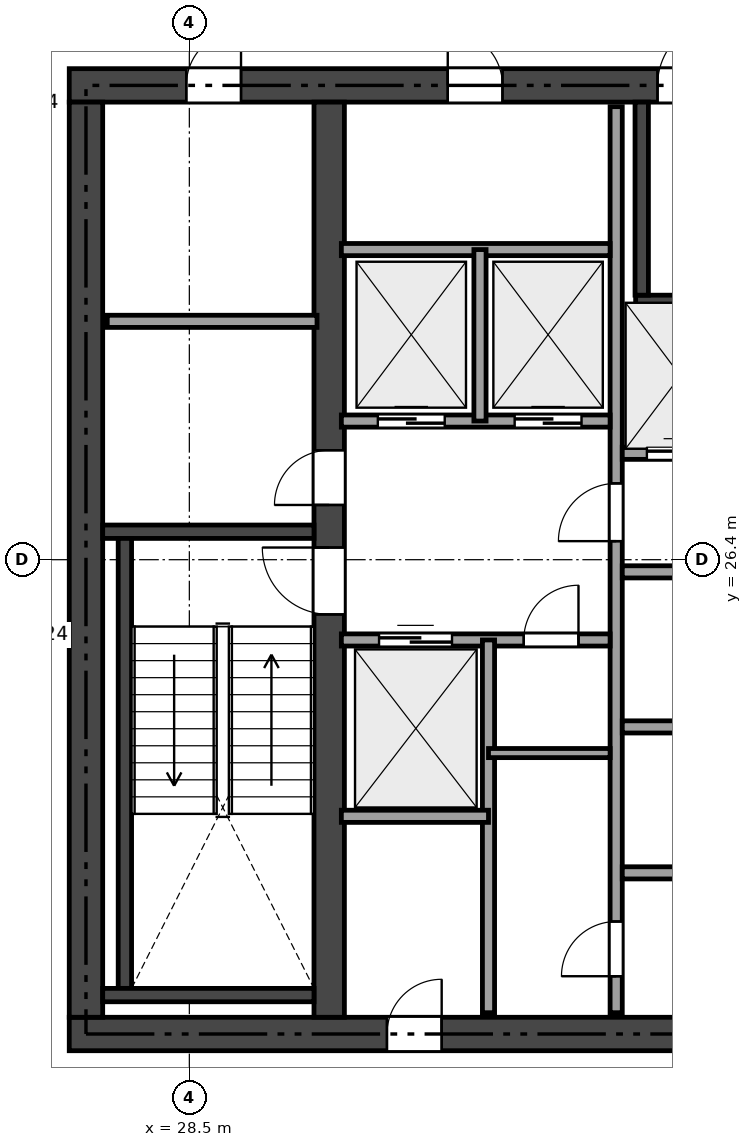
"""IFC4 building model, lengths in metres.
Left out: names, types, materials, properties, quantities, classifications, styles, units other than length and angle.
Written with IfcOpenShell. Run it as: python <this file> out.ifc"""

import sys

from ifc_helpers import new_model, si_unit, direction, frame, frame_2d, origin, place, context, subcontext, project, spatial, rectangle, extrude, element, fill, save


model = new_model("IFC4")
c1 = context("Model", 3, precision=1e-05, world=origin(), true_north=direction((0.0, 1.0)))
c2 = subcontext(c1, "Body", "Model", "MODEL_VIEW")
j1 = project(units=[si_unit("LENGTHUNIT", "METRE"), si_unit("PLANEANGLEUNIT", "RADIAN")], contexts=[c1])
p1 = place(None, origin())
s1 = spatial("IfcSite", under=j1, at=p1, CompositionType="ELEMENT")
p2 = place(p1, origin())
s2 = spatial("IfcBuilding", under=s1, at=p2, CompositionType="ELEMENT")
p3 = place(p2, frame((0.0, 0.0, 279.3)))
s3 = spatial("IfcBuildingStorey", under=s2, at=p3, CompositionType="ELEMENT", Elevation=279.3)
p4 = place(p3, frame((26.525, 18.6, 0.0), z_axis=(0.0, 0.0, 1.0), x_axis=(1.0, 0.0, 0.0)))
e1 = element("IfcWall", 1, at=p4, inside=s3, PredefinedType="SHEAR", context=c2, shape_type="SweptSolid", body=[
    extrude(rectangle(XDim=21.35, YDim=0.55, at=frame_2d((10.675, 0.0))), origin(), (0.0, 0.0, 1.0), 3.84),
])
p5 = place(p4, frame((12.4, 0.0, 0.0)))
e2 = element("IfcOpeningElement", 2, at=p5, cuts=e1, PredefinedType="OPENING", context=c2, shape_type="SweptSolid", body=[
    extrude(rectangle(XDim=1.15, YDim=2.15, at=frame_2d((0.575, 1.075))), frame((0.0, 0.285, 0.0), z_axis=(0.0, -1.0, 0.0), x_axis=(1.0, 0.0, 0.0)), (0.0, 0.0, 1.0), 0.57),
])
p6 = place(p4, frame((5.225, 0.0, 0.0)))
e3 = element("IfcOpeningElement", 3, at=p6, cuts=e1, PredefinedType="OPENING", context=c2, shape_type="SweptSolid", body=[
    extrude(rectangle(XDim=0.9, YDim=2.1, at=frame_2d((0.45, 1.05))), frame((0.0, 0.285, 0.0), z_axis=(0.0, -1.0, 0.0), x_axis=(1.0, 0.0, 0.0)), (0.0, 0.0, 1.0), 0.57),
])
p7 = place(p3, frame((26.525, 34.2, 0.0), z_axis=(0.0, 0.0, 1.0), x_axis=(1.0, 0.0, 0.0)))
e4 = element("IfcWall", 4, at=p7, inside=s3, PredefinedType="SHEAR", context=c2, shape_type="SweptSolid", body=[
    extrude(rectangle(XDim=21.35, YDim=0.55, at=frame_2d((10.675, 0.0))), origin(), (0.0, 0.0, 1.0), 3.84),
])
p8 = place(p7, frame((9.675, 0.0, 0.0)))
e5 = element("IfcOpeningElement", 5, at=p8, cuts=e4, PredefinedType="OPENING", context=c2, shape_type="SweptSolid", body=[
    extrude(rectangle(XDim=1.1, YDim=2.15, at=frame_2d((0.55, 1.075))), frame((0.0, 0.285, 0.0), z_axis=(0.0, -1.0, 0.0), x_axis=(1.0, 0.0, 0.0)), (0.0, 0.0, 1.0), 0.57),
])
p9 = place(p7, frame((1.925, 0.0, 0.0)))
e6 = element("IfcOpeningElement", 6, at=p9, cuts=e4, PredefinedType="OPENING", context=c2, shape_type="SweptSolid", body=[
    extrude(rectangle(XDim=0.9, YDim=2.1, at=frame_2d((0.45, 1.05))), frame((0.0, 0.285, 0.0), z_axis=(0.0, -1.0, 0.0), x_axis=(1.0, 0.0, 0.0)), (0.0, 0.0, 1.0), 0.57),
])
p10 = place(p7, frame((6.225, 0.0, 0.0)))
e7 = element("IfcOpeningElement", 7, at=p10, cuts=e4, PredefinedType="OPENING", context=c2, shape_type="SweptSolid", body=[
    extrude(rectangle(XDim=0.9, YDim=2.1, at=frame_2d((0.45, 1.05))), frame((0.0, 0.285, 0.0), z_axis=(0.0, -1.0, 0.0), x_axis=(1.0, 0.0, 0.0)), (0.0, 0.0, 1.0), 0.57),
])
p11 = place(p3, frame((26.8, 18.875, 0.0), z_axis=(0.0, 0.0, 1.0), x_axis=(0.0, 1.0, 0.0)))
e8 = element("IfcWall", 8, at=p11, inside=s3, PredefinedType="SHEAR", context=c2, shape_type="SweptSolid", body=[
    extrude(rectangle(XDim=15.05, YDim=0.55, at=frame_2d((7.525, 0.0))), origin(), (0.0, 0.0, 1.0), 3.84),
])
p12 = place(p3, frame((30.8, 18.875, 0.0), z_axis=(0.0, 0.0, 1.0), x_axis=(0.0, 1.0, 0.0)))
e9 = element("IfcWall", 9, at=p12, inside=s3, PredefinedType="SHEAR", context=c2, shape_type="SweptSolid", body=[
    extrude(rectangle(XDim=15.05, YDim=0.5, at=frame_2d((7.525, 0.0))), origin(), (0.0, 0.0, 1.0), 3.84),
])
p13 = place(p12, frame((6.625, 0.0, 0.0)))
e10 = element("IfcOpeningElement", 10, at=p13, cuts=e9, PredefinedType="OPENING", context=c2, shape_type="SweptSolid", body=[
    extrude(rectangle(XDim=1.1, YDim=2.15, at=frame_2d((0.55, 1.075))), frame((0.0, 0.26, 0.0), z_axis=(0.0, -1.0, 0.0), x_axis=(1.0, 0.0, 0.0)), (0.0, 0.0, 1.0), 0.52),
])
p14 = place(p12, frame((8.425, 0.0, 0.0)))
e11 = element("IfcOpeningElement", 11, at=p14, cuts=e9, PredefinedType="OPENING", context=c2, shape_type="SweptSolid", body=[
    extrude(rectangle(XDim=0.9, YDim=2.1, at=frame_2d((0.45, 1.05))), frame((0.0, 0.26, 0.0), z_axis=(0.0, -1.0, 0.0), x_axis=(1.0, 0.0, 0.0)), (0.0, 0.0, 1.0), 0.52),
])
p15 = place(p3, frame((27.075, 26.86, 0.0), z_axis=(0.0, 0.0, 1.0), x_axis=(1.0, 0.0, 0.0)))
e12 = element("IfcWall", 12, at=p15, inside=s3, PredefinedType="SHEAR", context=c2, shape_type="SweptSolid", body=[
    extrude(rectangle(XDim=3.475, YDim=0.22, at=frame_2d((1.738, 0.0))), origin(), (0.0, 0.0, 1.0), 3.84),
])
p16 = place(p3, frame((27.44, 19.35, 0.0), z_axis=(0.0, 0.0, 1.0), x_axis=(0.0, 1.0, 0.0)))
e13 = element("IfcWall", 13, at=p16, inside=s3, PredefinedType="SHEAR", context=c2, shape_type="SweptSolid", body=[
    extrude(rectangle(XDim=7.4, YDim=0.22, at=frame_2d((3.7, 0.0))), origin(), (0.0, 0.0, 1.0), 3.84),
])
p17 = place(p3, frame((27.075, 19.24, 0.0), z_axis=(0.0, 0.0, 1.0), x_axis=(1.0, 0.0, 0.0)))
e14 = element("IfcWall", 14, at=p17, inside=s3, PredefinedType="SHEAR", context=c2, shape_type="SweptSolid", body=[
    extrude(rectangle(XDim=3.475, YDim=0.22, at=frame_2d((1.738, 0.0))), origin(), (0.0, 0.0, 1.0), 3.84),
])
p18 = place(p3, frame((35.84, 30.64, 0.0), z_axis=(0.0, 0.0, 1.0), x_axis=(1.0, 0.0, 0.0)))
e15 = element("IfcWall", 15, at=p18, inside=s3, PredefinedType="SHEAR", context=c2, shape_type="SweptSolid", body=[
    extrude(rectangle(XDim=7.61, YDim=0.22, at=frame_2d((3.805, 0.0))), origin(), (0.0, 0.0, 1.0), 3.84),
])
p19 = place(p3, frame((35.94, 30.75, 0.0), z_axis=(0.0, 0.0, 1.0), x_axis=(0.0, 1.0, 0.0)))
e16 = element("IfcWall", 16, at=p19, inside=s3, PredefinedType="SHEAR", context=c2, shape_type="SweptSolid", body=[
    extrude(rectangle(XDim=3.175, YDim=0.22, at=frame_2d((1.587, 0.0))), origin(), (0.0, 0.0, 1.0), 3.84),
])
p20 = place(p3, frame((27.15, 30.32, 0.0), z_axis=(0.0, 0.0, 1.0), x_axis=(1.0, 0.0, 0.0)))
e17 = element("IfcWall", 17, at=p20, inside=s3, PredefinedType="SOLIDWALL", context=c2, shape_type="SweptSolid", body=[
    extrude(rectangle(XDim=3.45, YDim=0.2, at=frame_2d((1.725, 0.0))), origin(), (0.0, 0.0, 1.0), 3.513),
])
p21 = place(p3, frame((35.52, 18.95, 0.0), z_axis=(0.0, 0.0, 1.0), x_axis=(0.0, 1.0, 0.0)))
e18 = element("IfcWall", 18, at=p21, inside=s3, PredefinedType="SOLIDWALL", context=c2, shape_type="SweptSolid", body=[
    extrude(rectangle(XDim=14.9, YDim=0.2, at=frame_2d((7.45, 0.0))), origin(), (0.0, 0.0, 1.0), 3.361),
])
p22 = place(p21, frame((7.755, 0.0, 0.0)))
e19 = element("IfcOpeningElement", 19, at=p22, cuts=e18, PredefinedType="OPENING", context=c2, shape_type="SweptSolid", body=[
    extrude(rectangle(XDim=0.95, YDim=2.15, at=frame_2d((0.475, 1.075))), frame((0.0, 0.11, 0.0), z_axis=(0.0, -1.0, 0.0), x_axis=(1.0, 0.0, 0.0)), (0.0, 0.0, 1.0), 0.22),
])
p23 = place(p21, frame((0.6, 0.0, 0.0)))
e20 = element("IfcOpeningElement", 20, at=p23, cuts=e18, PredefinedType="OPENING", context=c2, shape_type="SweptSolid", body=[
    extrude(rectangle(XDim=0.9, YDim=2.1, at=frame_2d((0.45, 1.05))), frame((0.0, 0.11, 0.0), z_axis=(0.0, -1.0, 0.0), x_axis=(1.0, 0.0, 0.0)), (0.0, 0.0, 1.0), 0.22),
])
p24 = place(p3, frame((31.0, 28.68, 0.0), z_axis=(0.0, 0.0, 1.0), x_axis=(1.0, 0.0, 0.0)))
e21 = element("IfcWall", 21, at=p24, inside=s3, PredefinedType="SOLIDWALL", context=c2, shape_type="SweptSolid", body=[
    extrude(rectangle(XDim=4.42, YDim=0.2, at=frame_2d((2.21, 0.0))), origin(), (0.0, 0.0, 1.0), 3.84),
])
p25 = place(p24, frame((0.6, 0.0, 0.0)))
e22 = element("IfcOpeningElement", 22, at=p25, cuts=e21, PredefinedType="OPENING", context=c2, shape_type="SweptSolid", body=[
    extrude(rectangle(XDim=1.1, YDim=2.15, at=frame_2d((0.55, 1.075))), frame((0.0, 0.11, 0.0), z_axis=(0.0, -1.0, 0.0), x_axis=(1.0, 0.0, 0.0)), (0.0, 0.0, 1.0), 0.22),
])
p26 = place(p24, frame((2.85, 0.0, 0.0)))
e23 = element("IfcOpeningElement", 23, at=p26, cuts=e21, PredefinedType="OPENING", context=c2, shape_type="SweptSolid", body=[
    extrude(rectangle(XDim=1.1, YDim=2.15, at=frame_2d((0.55, 1.075))), frame((0.0, 0.11, 0.0), z_axis=(0.0, -1.0, 0.0), x_axis=(1.0, 0.0, 0.0)), (0.0, 0.0, 1.0), 0.22),
])
p27 = place(p3, frame((31.0, 31.5, 0.0), z_axis=(0.0, 0.0, 1.0), x_axis=(1.0, 0.0, 0.0)))
e24 = element("IfcWall", 24, at=p27, inside=s3, PredefinedType="SOLIDWALL", context=c2, shape_type="SweptSolid", body=[
    extrude(rectangle(XDim=4.42, YDim=0.2, at=frame_2d((2.21, 0.0))), origin(), (0.0, 0.0, 1.0), 3.84),
])
p28 = place(p3, frame((33.28, 28.68, 0.0), z_axis=(0.0, 0.0, 1.0), x_axis=(0.0, 1.0, 0.0)))
e25 = element("IfcWall", 25, at=p28, inside=s3, PredefinedType="SOLIDWALL", context=c2, shape_type="SweptSolid", body=[
    extrude(rectangle(XDim=2.82, YDim=0.2, at=frame_2d((1.41, 0.0))), origin(), (0.0, 0.0, 1.0), 3.84),
])
p29 = place(p3, frame((31.0, 25.08, 0.0), z_axis=(0.0, 0.0, 1.0), x_axis=(1.0, 0.0, 0.0)))
e26 = element("IfcWall", 26, at=p29, inside=s3, PredefinedType="SOLIDWALL", context=c2, shape_type="SweptSolid", body=[
    extrude(rectangle(XDim=4.42, YDim=0.2, at=frame_2d((2.21, 0.0))), origin(), (0.0, 0.0, 1.0), 3.84),
])
p30 = place(p29, frame((3.0, 0.0, 0.0)))
e27 = element("IfcOpeningElement", 27, at=p30, cuts=e26, PredefinedType="OPENING", context=c2, shape_type="SweptSolid", body=[
    extrude(rectangle(XDim=0.9, YDim=2.1, at=frame_2d((0.45, 1.05))), frame((0.0, 0.11, 0.0), z_axis=(0.0, -1.0, 0.0), x_axis=(1.0, 0.0, 0.0)), (0.0, 0.0, 1.0), 0.22),
])
p31 = place(p29, frame((0.62, 0.0, 0.0)))
e28 = element("IfcOpeningElement", 28, at=p31, cuts=e26, PredefinedType="OPENING", context=c2, shape_type="SweptSolid", body=[
    extrude(rectangle(XDim=1.2, YDim=2.15, at=frame_2d((0.6, 1.075))), frame((0.0, 0.11, 0.0), z_axis=(0.0, -1.0, 0.0), x_axis=(1.0, 0.0, 0.0)), (0.0, 0.0, 1.0), 0.22),
])
p32 = place(p3, frame((33.42, 18.95, 0.0), z_axis=(0.0, 0.0, 1.0), x_axis=(0.0, 1.0, 0.0)))
e29 = element("IfcWall", 29, at=p32, inside=s3, PredefinedType="SOLIDWALL", context=c2, shape_type="SweptSolid", body=[
    extrude(rectangle(XDim=6.13, YDim=0.2, at=frame_2d((3.065, 0.0))), origin(), (0.0, 0.0, 1.0), 3.361),
])
p33 = place(p3, frame((31.0, 22.18, 0.0), z_axis=(0.0, 0.0, 1.0), x_axis=(1.0, 0.0, 0.0)))
e30 = element("IfcWall", 30, at=p33, inside=s3, PredefinedType="SOLIDWALL", context=c2, shape_type="SweptSolid", body=[
    extrude(rectangle(XDim=2.42, YDim=0.2, at=frame_2d((1.21, 0.0))), origin(), (0.0, 0.0, 1.0), 3.84),
])
p34 = place(p3, frame((33.42, 23.22, 0.0), z_axis=(0.0, 0.0, 1.0), x_axis=(1.0, 0.0, 0.0)))
e31 = element("IfcWall", 31, at=p34, inside=s3, PredefinedType="PARTITIONING", context=c2, shape_type="SweptSolid", body=[
    extrude(rectangle(XDim=2.0, YDim=0.15, at=frame_2d((1.0, 0.0))), origin(), (0.0, 0.0, 1.0), 3.84),
])
p35 = place(p3, frame((35.62, 28.15, 0.0), z_axis=(0.0, 0.0, 1.0), x_axis=(1.0, 0.0, 0.0)))
e32 = element("IfcWall", 32, at=p35, inside=s3, PredefinedType="SOLIDWALL", context=c2, shape_type="SweptSolid", body=[
    extrude(rectangle(XDim=7.88, YDim=0.2, at=frame_2d((3.94, 0.0))), origin(), (0.0, 0.0, 1.0), 3.84),
])
p36 = place(p35, frame((0.405, 0.0, 0.0)))
e33 = element("IfcOpeningElement", 33, at=p36, cuts=e32, PredefinedType="OPENING", context=c2, shape_type="SweptSolid", body=[
    extrude(rectangle(XDim=1.1, YDim=2.15, at=frame_2d((0.55, 1.075))), frame((0.0, 0.11, 0.0), z_axis=(0.0, -1.0, 0.0), x_axis=(1.0, 0.0, 0.0)), (0.0, 0.0, 1.0), 0.22),
])
p37 = place(p35, frame((2.355, 0.0, 0.0)))
e34 = element("IfcOpeningElement", 34, at=p37, cuts=e32, PredefinedType="OPENING", context=c2, shape_type="SweptSolid", body=[
    extrude(rectangle(XDim=1.1, YDim=2.15, at=frame_2d((0.55, 1.075))), frame((0.0, 0.11, 0.0), z_axis=(0.0, -1.0, 0.0), x_axis=(1.0, 0.0, 0.0)), (0.0, 0.0, 1.0), 0.22),
])
p38 = place(p35, frame((4.305, 0.0, 0.0)))
e35 = element("IfcOpeningElement", 35, at=p38, cuts=e32, PredefinedType="OPENING", context=c2, shape_type="SweptSolid", body=[
    extrude(rectangle(XDim=1.1, YDim=2.15, at=frame_2d((0.55, 1.075))), frame((0.0, 0.11, 0.0), z_axis=(0.0, -1.0, 0.0), x_axis=(1.0, 0.0, 0.0)), (0.0, 0.0, 1.0), 0.22),
])
p39 = place(p35, frame((6.255, 0.0, 0.0)))
e36 = element("IfcOpeningElement", 36, at=p39, cuts=e32, PredefinedType="OPENING", context=c2, shape_type="SweptSolid", body=[
    extrude(rectangle(XDim=1.1, YDim=2.15, at=frame_2d((0.55, 1.075))), frame((0.0, 0.11, 0.0), z_axis=(0.0, -1.0, 0.0), x_axis=(1.0, 0.0, 0.0)), (0.0, 0.0, 1.0), 0.22),
])
p40 = place(p3, frame((35.62, 26.2, 0.0), z_axis=(0.0, 0.0, 1.0), x_axis=(1.0, 0.0, 0.0)))
e37 = element("IfcWall", 37, at=p40, inside=s3, PredefinedType="SOLIDWALL", context=c2, shape_type="SweptSolid", body=[
    extrude(rectangle(XDim=7.88, YDim=0.2, at=frame_2d((3.94, 0.0))), origin(), (0.0, 0.0, 1.0), 3.84),
])
p41 = place(p40, frame((1.13, 0.0, 0.0)))
e38 = element("IfcOpeningElement", 38, at=p41, cuts=e37, PredefinedType="OPENING", context=c2, shape_type="SweptSolid", body=[
    extrude(rectangle(XDim=0.9, YDim=2.1, at=frame_2d((0.45, 1.05))), frame((0.0, 0.11, 0.0), z_axis=(0.0, -1.0, 0.0), x_axis=(1.0, 0.0, 0.0)), (0.0, 0.0, 1.0), 0.22),
])
p42 = place(p40, frame((5.73, 0.0, 0.0)))
e39 = element("IfcOpeningElement", 39, at=p42, cuts=e37, PredefinedType="OPENING", context=c2, shape_type="SweptSolid", body=[
    extrude(rectangle(XDim=0.9, YDim=2.1, at=frame_2d((0.45, 1.05))), frame((0.0, 0.11, 0.0), z_axis=(0.0, -1.0, 0.0), x_axis=(1.0, 0.0, 0.0)), (0.0, 0.0, 1.0), 0.22),
])
p43 = place(p3, frame((35.62, 23.65, 0.0), z_axis=(0.0, 0.0, 1.0), x_axis=(1.0, 0.0, 0.0)))
e40 = element("IfcWall", 40, at=p43, inside=s3, PredefinedType="SOLIDWALL", context=c2, shape_type="SweptSolid", body=[
    extrude(rectangle(XDim=7.88, YDim=0.2, at=frame_2d((3.94, 0.0))), origin(), (0.0, 0.0, 1.0), 3.361),
])
p44 = place(p3, frame((35.62, 21.25, 0.0), z_axis=(0.0, 0.0, 1.0), x_axis=(1.0, 0.0, 0.0)))
e41 = element("IfcWall", 41, at=p44, inside=s3, PredefinedType="SOLIDWALL", context=c2, shape_type="SweptSolid", body=[
    extrude(rectangle(XDim=7.88, YDim=0.2, at=frame_2d((3.94, 0.0))), origin(), (0.0, 0.0, 1.0), 3.84),
])
p45 = place(p44, frame((1.13, 0.0, 0.0)))
e42 = element("IfcOpeningElement", 42, at=p45, cuts=e41, PredefinedType="OPENING", context=c2, shape_type="SweptSolid", body=[
    extrude(rectangle(XDim=0.9, YDim=2.1, at=frame_2d((0.45, 1.05))), frame((0.0, 0.11, 0.0), z_axis=(0.0, -1.0, 0.0), x_axis=(1.0, 0.0, 0.0)), (0.0, 0.0, 1.0), 0.22),
])
p46 = place(p44, frame((5.73, 0.0, 0.0)))
e43 = element("IfcOpeningElement", 43, at=p46, cuts=e41, PredefinedType="OPENING", context=c2, shape_type="SweptSolid", body=[
    extrude(rectangle(XDim=0.9, YDim=2.1, at=frame_2d((0.45, 1.05))), frame((0.0, 0.11, 0.0), z_axis=(0.0, -1.0, 0.0), x_axis=(1.0, 0.0, 0.0)), (0.0, 0.0, 1.0), 0.22),
])
p47 = place(p13, origin())
e44 = element("IfcDoor", 44, at=p47, inside=s3, OperationType="SINGLE_SWING_RIGHT", PredefinedType="DOOR", context=c2, shape_type="SweptSolid", body=[
    extrude(rectangle(XDim=1.1, YDim=2.15, at=frame_2d((0.55, 1.075))), frame((0.0, 0.025, 0.0), z_axis=(0.0, -1.0, 0.0), x_axis=(1.0, 0.0, 0.0)), (0.0, 0.0, 1.0), 0.05),
])
fill(e10, e44)
p48 = place(p8, origin())
e45 = element("IfcDoor", 45, at=p48, inside=s3, OperationType="SINGLE_SWING_RIGHT", PredefinedType="DOOR", context=c2, shape_type="SweptSolid", body=[
    extrude(rectangle(XDim=1.1, YDim=2.15, at=frame_2d((0.55, 1.075))), frame((0.0, 0.025, 0.0), z_axis=(0.0, -1.0, 0.0), x_axis=(1.0, 0.0, 0.0)), (0.0, 0.0, 1.0), 0.05),
])
fill(e5, e45)
p49 = place(p22, origin())
e46 = element("IfcDoor", 46, at=p49, inside=s3, OperationType="SINGLE_SWING_LEFT", PredefinedType="DOOR", context=c2, shape_type="SweptSolid", body=[
    extrude(rectangle(XDim=0.95, YDim=2.15, at=frame_2d((0.475, 1.075))), frame((0.0, 0.025, 0.0), z_axis=(0.0, -1.0, 0.0), x_axis=(1.0, 0.0, 0.0)), (0.0, 0.0, 1.0), 0.05),
])
fill(e19, e46)
p50 = place(p14, origin())
e47 = element("IfcDoor", 47, at=p50, inside=s3, OperationType="SINGLE_SWING_LEFT", PredefinedType="DOOR", context=c2, shape_type="SweptSolid", body=[
    extrude(rectangle(XDim=0.9, YDim=2.1, at=frame_2d((0.45, 1.05))), frame((0.0, 0.025, 0.0), z_axis=(0.0, -1.0, 0.0), x_axis=(1.0, 0.0, 0.0)), (0.0, 0.0, 1.0), 0.05),
])
fill(e11, e47)
p51 = place(p9, origin())
e48 = element("IfcDoor", 48, at=p51, inside=s3, OperationType="SINGLE_SWING_RIGHT", PredefinedType="DOOR", context=c2, shape_type="SweptSolid", body=[
    extrude(rectangle(XDim=0.9, YDim=2.1, at=frame_2d((0.45, 1.05))), frame((0.0, 0.025, 0.0), z_axis=(0.0, -1.0, 0.0), x_axis=(1.0, 0.0, 0.0)), (0.0, 0.0, 1.0), 0.05),
])
fill(e6, e48)
p52 = place(p10, origin())
e49 = element("IfcDoor", 49, at=p52, inside=s3, OperationType="SINGLE_SWING_LEFT", PredefinedType="DOOR", context=c2, shape_type="SweptSolid", body=[
    extrude(rectangle(XDim=0.9, YDim=2.1, at=frame_2d((0.45, 1.05))), frame((0.0, 0.025, 0.0), z_axis=(0.0, -1.0, 0.0), x_axis=(1.0, 0.0, 0.0)), (0.0, 0.0, 1.0), 0.05),
])
fill(e7, e49)
p53 = place(p6, origin())
e50 = element("IfcDoor", 50, at=p53, inside=s3, OperationType="SINGLE_SWING_RIGHT", PredefinedType="DOOR", context=c2, shape_type="SweptSolid", body=[
    extrude(rectangle(XDim=0.9, YDim=2.1, at=frame_2d((0.45, 1.05))), frame((0.0, 0.025, 0.0), z_axis=(0.0, -1.0, 0.0), x_axis=(1.0, 0.0, 0.0)), (0.0, 0.0, 1.0), 0.05),
])
fill(e3, e50)
p54 = place(p23, origin())
e51 = element("IfcDoor", 51, at=p54, inside=s3, OperationType="SINGLE_SWING_LEFT", PredefinedType="DOOR", context=c2, shape_type="SweptSolid", body=[
    extrude(rectangle(XDim=0.9, YDim=2.1, at=frame_2d((0.45, 1.05))), frame((0.0, 0.025, 0.0), z_axis=(0.0, -1.0, 0.0), x_axis=(1.0, 0.0, 0.0)), (0.0, 0.0, 1.0), 0.05),
])
fill(e20, e51)
p55 = place(p30, origin())
e52 = element("IfcDoor", 52, at=p55, inside=s3, OperationType="SINGLE_SWING_RIGHT", PredefinedType="DOOR", context=c2, shape_type="SweptSolid", body=[
    extrude(rectangle(XDim=0.9, YDim=2.1, at=frame_2d((0.45, 1.05))), frame((0.0, 0.025, 0.0), z_axis=(0.0, -1.0, 0.0), x_axis=(1.0, 0.0, 0.0)), (0.0, 0.0, 1.0), 0.05),
])
fill(e27, e52)
p56 = place(p25, origin())
e53 = element("IfcDoor", 53, at=p56, inside=s3, OperationType="SLIDING_TO_LEFT", PredefinedType="DOOR", context=c2, shape_type="SweptSolid", body=[
    extrude(rectangle(XDim=1.1, YDim=2.15, at=frame_2d((0.55, 1.075))), frame((0.0, 0.025, 0.0), z_axis=(0.0, -1.0, 0.0), x_axis=(1.0, 0.0, 0.0)), (0.0, 0.0, 1.0), 0.05),
])
fill(e22, e53)
p57 = place(p26, origin())
e54 = element("IfcDoor", 54, at=p57, inside=s3, OperationType="SLIDING_TO_LEFT", PredefinedType="DOOR", context=c2, shape_type="SweptSolid", body=[
    extrude(rectangle(XDim=1.1, YDim=2.15, at=frame_2d((0.55, 1.075))), frame((0.0, 0.025, 0.0), z_axis=(0.0, -1.0, 0.0), x_axis=(1.0, 0.0, 0.0)), (0.0, 0.0, 1.0), 0.05),
])
fill(e23, e54)
p58 = place(p31, origin())
e55 = element("IfcDoor", 55, at=p58, inside=s3, OperationType="SLIDING_TO_LEFT", PredefinedType="DOOR", context=c2, shape_type="SweptSolid", body=[
    extrude(rectangle(XDim=1.2, YDim=2.15, at=frame_2d((0.6, 1.075))), frame((0.0, 0.025, 0.0), z_axis=(0.0, -1.0, 0.0), x_axis=(1.0, 0.0, 0.0)), (0.0, 0.0, 1.0), 0.05),
])
fill(e28, e55)
p59 = place(p36, origin())
e56 = element("IfcDoor", 56, at=p59, inside=s3, OperationType="SLIDING_TO_LEFT", PredefinedType="DOOR", context=c2, shape_type="SweptSolid", body=[
    extrude(rectangle(XDim=1.1, YDim=2.15, at=frame_2d((0.55, 1.075))), frame((0.0, 0.025, 0.0), z_axis=(0.0, -1.0, 0.0), x_axis=(1.0, 0.0, 0.0)), (0.0, 0.0, 1.0), 0.05),
])
fill(e33, e56)
save(model, sys.argv[1])
